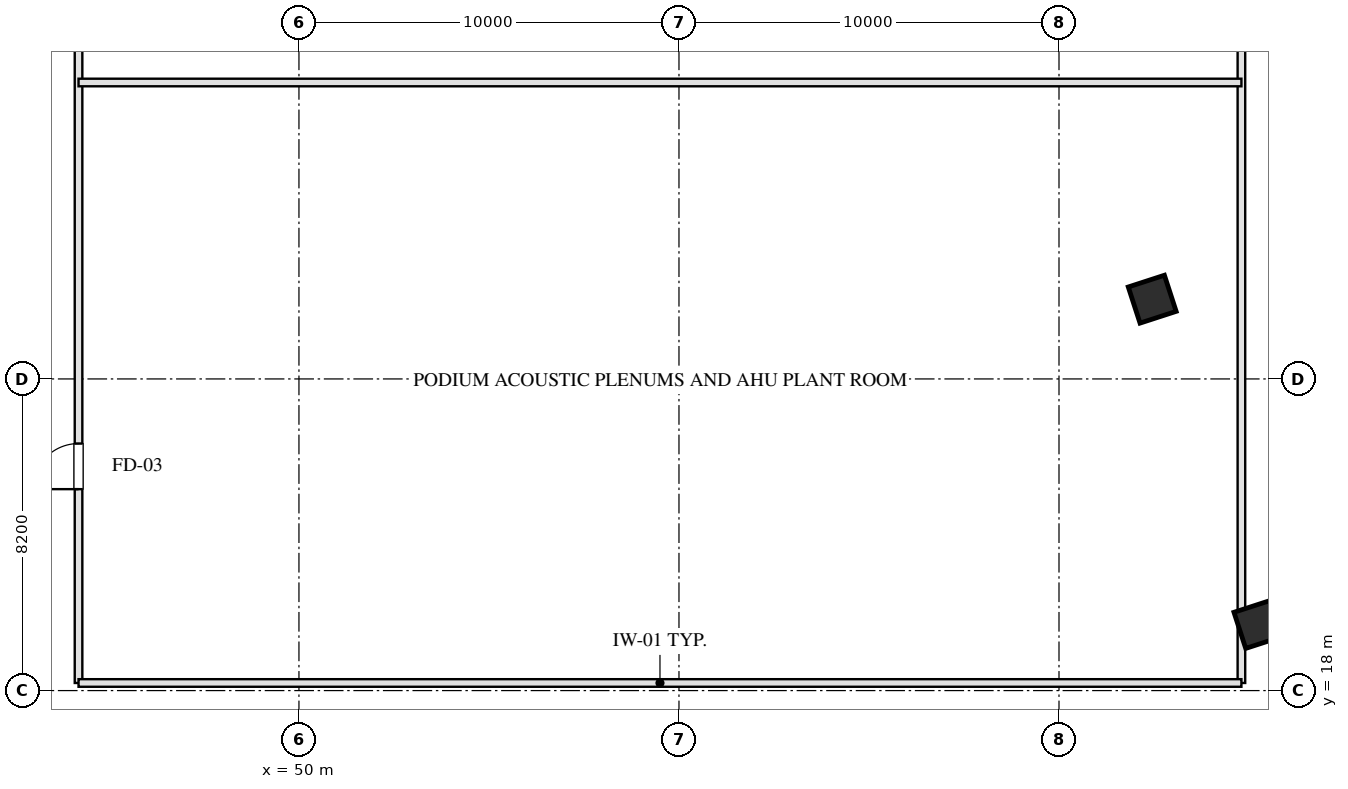
"""IFC4 building model, lengths in metres.
Left out: names, types, materials, properties, quantities, classifications, styles, units other than length and angle.
Written with IfcOpenShell. Run it as: python <this file> out.ifc"""

import sys

from ifc_helpers import new_model, si_unit, direction, frame, frame_2d, origin, origin_2d, place, context, subcontext, project, spatial, rectangle, hollow_rectangle, extrude, element, fill, save


model = new_model("IFC4")
c1 = context("Model", 3, precision=1e-05, world=origin(), true_north=direction((0.0, 1.0)))
c2 = subcontext(c1, "Body", "Model", "MODEL_VIEW")
j1 = project(units=[si_unit("LENGTHUNIT", "METRE"), si_unit("PLANEANGLEUNIT", "RADIAN")], contexts=[c1])
p1 = place(None, origin())
s1 = spatial("IfcSite", under=j1, at=p1, CompositionType="ELEMENT")
p2 = place(p1, origin())
s2 = spatial("IfcBuilding", under=s1, at=p2, CompositionType="ELEMENT")
p3 = place(p2, frame((0.0, 0.0, 16.5)))
s3 = spatial("IfcBuildingStorey", under=s2, at=p3, CompositionType="ELEMENT", Elevation=16.5)
for number, where, z_axis, x_axis in (
    (1, (75.234, 19.739, 0.0), (0.0, 0.0, 1.0), (0.951, 0.309, 0.0)),
    (2, (72.453, 28.299, 0.0), (0.0, 0.0, 1.0), (0.951, 0.309, 0.0)),
):
    element("IfcColumn", number, at=place(p3, frame(where, z_axis=z_axis, x_axis=x_axis)), inside=s3, PredefinedType="COLUMN", context=c2, shape_type="SweptSolid", body=[
        extrude(hollow_rectangle(XDim=1.0, YDim=1.0, WallThickness=0.036, at=origin_2d()), origin(), (0.0, 0.0, 1.0), 5.501),
    ])
p4 = place(p3, frame((44.2, 18.2, 0.0), z_axis=(0.0, 0.0, 1.0), x_axis=(0.0, 1.0, 0.0)))
e3 = element("IfcWall", 3, at=p4, inside=s3, PredefinedType="PARTITIONING", context=c2, shape_type="SweptSolid", body=[
    extrude(rectangle(XDim=31.6, YDim=0.2, at=frame_2d((15.8, 0.0))), origin(), (0.0, 0.0, 1.0), 5.185),
])
p5 = place(p4, frame((5.1, 0.0, 0.0)))
e4 = element("IfcOpeningElement", 4, at=p5, cuts=e3, PredefinedType="OPENING", context=c2, shape_type="SweptSolid", body=[
    extrude(rectangle(XDim=1.2, YDim=2.05, at=frame_2d((0.6, 1.025))), frame((0.0, 0.11, 0.0), z_axis=(0.0, -1.0, 0.0), x_axis=(1.0, 0.0, 0.0)), (0.0, 0.0, 1.0), 0.22),
])
p6 = place(p4, frame((20.0, 0.0, 0.0)))
e5 = element("IfcOpeningElement", 5, at=p6, cuts=e3, PredefinedType="OPENING", context=c2, shape_type="SweptSolid", body=[
    extrude(rectangle(XDim=1.2, YDim=2.05, at=frame_2d((0.6, 1.025))), frame((0.0, 0.11, 0.0), z_axis=(0.0, -1.0, 0.0), x_axis=(1.0, 0.0, 0.0)), (0.0, 0.0, 1.0), 0.22),
])
p7 = place(p3, frame((74.8, 18.2, 0.0), z_axis=(0.0, 0.0, 1.0), x_axis=(0.0, 1.0, 0.0)))
e6 = element("IfcWall", 6, at=p7, inside=s3, PredefinedType="PARTITIONING", context=c2, shape_type="SweptSolid", body=[
    extrude(rectangle(XDim=31.6, YDim=0.2, at=frame_2d((15.8, 0.0))), origin(), (0.0, 0.0, 1.0), 5.185),
])
p8 = place(p7, frame((23.0, 0.0, 0.0)))
e7 = element("IfcOpeningElement", 7, at=p8, cuts=e6, PredefinedType="OPENING", context=c2, shape_type="SweptSolid", body=[
    extrude(rectangle(XDim=1.2, YDim=2.05, at=frame_2d((0.6, 1.025))), frame((0.0, 0.11, 0.0), z_axis=(0.0, -1.0, 0.0), x_axis=(1.0, 0.0, 0.0)), (0.0, 0.0, 1.0), 0.22),
])
p9 = place(p3, frame((44.2, 18.2, 0.0), z_axis=(0.0, 0.0, 1.0), x_axis=(1.0, 0.0, 0.0)))
e8 = element("IfcWall", 8, at=p9, inside=s3, PredefinedType="PARTITIONING", context=c2, shape_type="SweptSolid", body=[
    extrude(rectangle(XDim=30.6, YDim=0.2, at=frame_2d((15.3, 0.0))), origin(), (0.0, 0.0, 1.0), 5.185),
])
p10 = place(p3, frame((44.2, 34.0, 0.0), z_axis=(0.0, 0.0, 1.0), x_axis=(1.0, 0.0, 0.0)))
e9 = element("IfcWall", 9, at=p10, inside=s3, PredefinedType="PARTITIONING", context=c2, shape_type="SweptSolid", body=[
    extrude(rectangle(XDim=30.6, YDim=0.2, at=frame_2d((15.3, 0.0))), origin(), (0.0, 0.0, 1.0), 3.775),
])
p11 = place(p5, origin())
e10 = element("IfcDoor", 10, at=p11, inside=s3, OperationType="SINGLE_SWING_LEFT", PredefinedType="DOOR", context=c2, shape_type="SweptSolid", body=[
    extrude(rectangle(XDim=1.2, YDim=2.05, at=frame_2d((0.6, 1.025))), frame((0.0, 0.025, 0.0), z_axis=(0.0, -1.0, 0.0), x_axis=(1.0, 0.0, 0.0)), (0.0, 0.0, 1.0), 0.05),
])
fill(e4, e10)
save(model, sys.argv[1])
